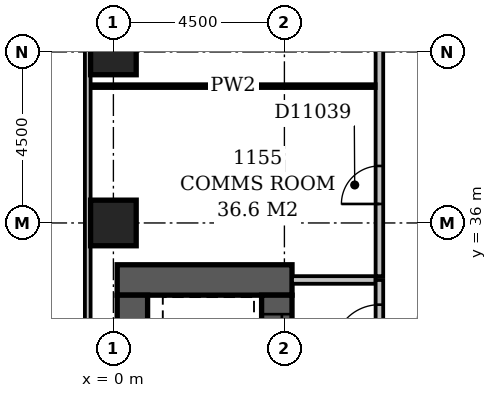
"""IFC4 building model, lengths in metres.
Left out: names, types, materials, properties, quantities, classifications, styles, units other than length and angle.
Written with IfcOpenShell. Run it as: python <this file> out.ifc"""

import sys

from ifc_helpers import new_model, si_unit, direction, frame, frame_2d, origin, origin_2d, place, context, subcontext, project, spatial, rectangle, extrude, element, fill, save


model = new_model("IFC4")
c1 = context("Model", 3, precision=1e-05, world=origin(), true_north=direction((0.0, 1.0)))
c2 = subcontext(c1, "Body", "Model", "MODEL_VIEW")
j1 = project(units=[si_unit("LENGTHUNIT", "METRE"), si_unit("PLANEANGLEUNIT", "RADIAN")], contexts=[c1])
p1 = place(None, origin())
s1 = spatial("IfcSite", under=j1, at=p1, CompositionType="ELEMENT")
p2 = place(p1, origin())
s2 = spatial("IfcBuilding", under=s1, at=p2, CompositionType="ELEMENT")
p3 = place(p2, frame((0.0, 0.0, 50.6)))
s3 = spatial("IfcBuildingStorey", under=s2, at=p3, CompositionType="ELEMENT", Elevation=50.6)
p4 = place(p3, frame((0.1, 34.5, -0.3), z_axis=(0.0, 0.0, 1.0), x_axis=(1.0, 0.0, 0.0)))
e1 = element("IfcWall", 1, at=p4, inside=s3, PredefinedType="SHEAR", context=c2, shape_type="SweptSolid", body=[
    extrude(rectangle(XDim=4.6, YDim=0.8, at=frame_2d((2.3, 0.0))), origin(), (0.0, 0.0, 1.0), 3.6),
])
p5 = place(p3, frame((0.5, 27.15, -0.3), z_axis=(0.0, 0.0, 1.0), x_axis=(0.0, 1.0, 0.0)))
e2 = element("IfcWall", 2, at=p5, inside=s3, PredefinedType="SHEAR", context=c2, shape_type="SweptSolid", body=[
    extrude(rectangle(XDim=6.95, YDim=0.8, at=frame_2d((3.475, 0.0))), origin(), (0.0, 0.0, 1.0), 3.6),
])
p6 = place(p3, frame((4.3, 27.15, -0.3), z_axis=(0.0, 0.0, 1.0), x_axis=(0.0, 1.0, 0.0)))
e3 = element("IfcWall", 3, at=p6, inside=s3, PredefinedType="SHEAR", context=c2, shape_type="SweptSolid", body=[
    extrude(rectangle(XDim=6.95, YDim=0.8, at=frame_2d((3.475, 0.0))), origin(), (0.0, 0.0, 1.0), 3.6),
])
p7 = place(p6, frame((3.05, 0.0, 0.3)))
e4 = element("IfcOpeningElement", 4, at=p7, cuts=e3, PredefinedType="OPENING", context=c2, shape_type="SweptSolid", body=[
    extrude(rectangle(XDim=1.1, YDim=2.1, at=frame_2d((0.55, 1.05))), frame((0.0, 0.412, 0.0), z_axis=(0.0, -1.0, 0.0), x_axis=(1.0, 0.0, 0.0)), (0.0, 0.0, 1.0), 0.824),
])
p8 = place(p6, frame((0.55, 0.0, 0.3)))
e5 = element("IfcOpeningElement", 5, at=p8, cuts=e3, PredefinedType="OPENING", context=c2, shape_type="SweptSolid", body=[
    extrude(rectangle(XDim=1.1, YDim=2.1, at=frame_2d((0.55, 1.05))), frame((0.0, 0.412, 0.0), z_axis=(0.0, -1.0, 0.0), x_axis=(1.0, 0.0, 0.0)), (0.0, 0.0, 1.0), 0.824),
])
p9 = place(p6, frame((5.35, 0.0, 0.3)))
e6 = element("IfcOpeningElement", 6, at=p9, cuts=e3, PredefinedType="OPENING", context=c2, shape_type="SweptSolid", body=[
    extrude(rectangle(XDim=1.1, YDim=2.1, at=frame_2d((0.55, 1.05))), frame((0.0, 0.412, 0.0), z_axis=(0.0, -1.0, 0.0), x_axis=(1.0, 0.0, 0.0)), (0.0, 0.0, 1.0), 0.824),
])
for number, where, z_axis, x_axis in (
    (7, (0.0, 36.0, -0.3), (0.0, 0.0, 1.0), (1.0, 0.0, 0.0)),
    (8, (0.0, 40.5, -0.3), (0.0, 0.0, 1.0), (1.0, 0.0, 0.0)),
):
    element("IfcColumn", number, at=place(p3, frame(where, z_axis=z_axis, x_axis=x_axis)), inside=s3, PredefinedType="COLUMN", context=c2, shape_type="SweptSolid", body=[
        extrude(rectangle(XDim=1.2, YDim=1.2, at=origin_2d()), origin(), (0.0, 0.0, 1.0), 3.6),
    ])
p10 = place(p3, frame((-0.675, 59.1, 0.0), z_axis=(0.0, 0.0, 1.0), x_axis=(0.0, -1.0, 0.0)))
e9 = element("IfcWall", 9, at=p10, inside=s3, PredefinedType="STANDARD", context=c2, shape_type="SweptSolid", body=[
    extrude(rectangle(XDim=55.35, YDim=0.15, at=frame_2d((27.675, 0.0))), origin(), (0.0, 0.0, 1.0), 2.7),
])
p11 = place(p10, frame((10.65, 0.0, 0.6)))
e10 = element("IfcOpeningElement", 10, at=p11, cuts=e9, PredefinedType="OPENING", context=c2, shape_type="SweptSolid", body=[
    extrude(rectangle(XDim=2.4, YDim=1.8, at=frame_2d((1.2, 0.9))), frame((0.0, 0.087, 0.0), z_axis=(0.0, -1.0, 0.0), x_axis=(1.0, 0.0, 0.0)), (0.0, 0.0, 1.0), 0.174),
])
p12 = place(p10, frame((42.15, 0.0, 0.6)))
e11 = element("IfcOpeningElement", 11, at=p12, cuts=e9, PredefinedType="OPENING", context=c2, shape_type="SweptSolid", body=[
    extrude(rectangle(XDim=2.4, YDim=1.8, at=frame_2d((1.2, 0.9))), frame((0.0, 0.087, 0.0), z_axis=(0.0, -1.0, 0.0), x_axis=(1.0, 0.0, 0.0)), (0.0, 0.0, 1.0), 0.174),
])
p13 = place(p3, frame((7.0, 32.1, 0.0), z_axis=(0.0, 0.0, 1.0), x_axis=(0.0, 1.0, 0.0)))
e12 = element("IfcWall", 12, at=p13, inside=s3, PredefinedType="PARTITIONING", context=c2, shape_type="SweptSolid", body=[
    extrude(rectangle(XDim=2.4, YDim=0.2, at=frame_2d((1.2, 0.0))), origin(), (0.0, 0.0, 1.0), 3.3),
])
p14 = place(p13, frame((0.55, 0.0, 0.0)))
e13 = element("IfcOpeningElement", 13, at=p14, cuts=e12, PredefinedType="OPENING", context=c2, shape_type="SweptSolid", body=[
    extrude(rectangle(XDim=1.2, YDim=2.1, at=frame_2d((0.6, 1.05))), frame((0.0, 0.112, 0.0), z_axis=(0.0, -1.0, 0.0), x_axis=(1.0, 0.0, 0.0)), (0.0, 0.0, 1.0), 0.224),
])
p15 = place(p3, frame((4.7, 34.5, 0.0), z_axis=(0.0, 0.0, 1.0), x_axis=(1.0, 0.0, 0.0)))
e14 = element("IfcWall", 14, at=p15, inside=s3, PredefinedType="PARTITIONING", context=c2, shape_type="SweptSolid", body=[
    extrude(rectangle(XDim=2.2, YDim=0.2, at=frame_2d((1.1, 0.0))), origin(), (0.0, 0.0, 1.0), 3.3),
])
p16 = place(p3, frame((7.0, 34.6, 0.0), z_axis=(0.0, 0.0, 1.0), x_axis=(0.0, 1.0, 0.0)))
e15 = element("IfcWall", 15, at=p16, inside=s3, PredefinedType="PARTITIONING", context=c2, shape_type="SweptSolid", body=[
    extrude(rectangle(XDim=14.8, YDim=0.2, at=frame_2d((7.4, 0.0))), origin(), (0.0, 0.0, 1.0), 3.3),
])
p17 = place(p16, frame((1.9, 0.0, 0.0)))
e16 = element("IfcOpeningElement", 16, at=p17, cuts=e15, PredefinedType="OPENING", context=c2, shape_type="SweptSolid", body=[
    extrude(rectangle(XDim=1.0, YDim=2.1, at=frame_2d((0.5, 1.05))), frame((0.0, 0.112, 0.0), z_axis=(0.0, -1.0, 0.0), x_axis=(1.0, 0.0, 0.0)), (0.0, 0.0, 1.0), 0.224),
])
p18 = place(p16, frame((6.9, 0.0, 0.0)))
e17 = element("IfcOpeningElement", 17, at=p18, cuts=e15, PredefinedType="OPENING", context=c2, shape_type="SweptSolid", body=[
    extrude(rectangle(XDim=1.0, YDim=2.1, at=frame_2d((0.5, 1.05))), frame((0.0, 0.112, 0.0), z_axis=(0.0, -1.0, 0.0), x_axis=(1.0, 0.0, 0.0)), (0.0, 0.0, 1.0), 0.224),
])
p19 = place(p16, frame((11.95, 0.0, 0.0)))
e18 = element("IfcOpeningElement", 18, at=p19, cuts=e15, PredefinedType="OPENING", context=c2, shape_type="SweptSolid", body=[
    extrude(rectangle(XDim=0.9, YDim=2.1, at=frame_2d((0.45, 1.05))), frame((0.0, 0.112, 0.0), z_axis=(0.0, -1.0, 0.0), x_axis=(1.0, 0.0, 0.0)), (0.0, 0.0, 1.0), 0.224),
])
p20 = place(p3, frame((-0.6, 39.6, 0.0), z_axis=(0.0, 0.0, 1.0), x_axis=(1.0, 0.0, 0.0)))
e19 = element("IfcWall", 19, at=p20, inside=s3, PredefinedType="PARTITIONING", context=c2, shape_type="SweptSolid", body=[
    extrude(rectangle(XDim=7.5, YDim=0.1, at=frame_2d((3.75, 0.0))), origin(), (0.0, 0.0, 1.0), 3.3),
])
p21 = place(p14, origin())
e20 = element("IfcDoor", 20, at=p21, inside=s3, OperationType="SINGLE_SWING_LEFT", PredefinedType="DOOR", context=c2, shape_type="SweptSolid", body=[
    extrude(rectangle(XDim=1.2, YDim=2.1, at=frame_2d((0.6, 1.05))), frame((0.0, 0.025, 0.0), z_axis=(0.0, -1.0, 0.0), x_axis=(1.0, 0.0, 0.0)), (0.0, 0.0, 1.0), 0.05),
])
fill(e13, e20)
p22 = place(p9, origin())
e21 = element("IfcDoor", 21, at=p22, inside=s3, OperationType="SLIDING_TO_LEFT", PredefinedType="DOOR", context=c2, shape_type="SweptSolid", body=[
    extrude(rectangle(XDim=1.1, YDim=2.1, at=frame_2d((0.55, 1.05))), frame((0.0, 0.025, 0.0), z_axis=(0.0, -1.0, 0.0), x_axis=(1.0, 0.0, 0.0)), (0.0, 0.0, 1.0), 0.05),
])
fill(e6, e21)
p23 = place(p17, origin())
e22 = element("IfcDoor", 22, at=p23, inside=s3, OperationType="SINGLE_SWING_LEFT", PredefinedType="DOOR", context=c2, shape_type="SweptSolid", body=[
    extrude(rectangle(XDim=1.0, YDim=2.1, at=frame_2d((0.5, 1.05))), frame((0.0, 0.025, 0.0), z_axis=(0.0, -1.0, 0.0), x_axis=(1.0, 0.0, 0.0)), (0.0, 0.0, 1.0), 0.05),
])
fill(e16, e22)
save(model, sys.argv[1])
